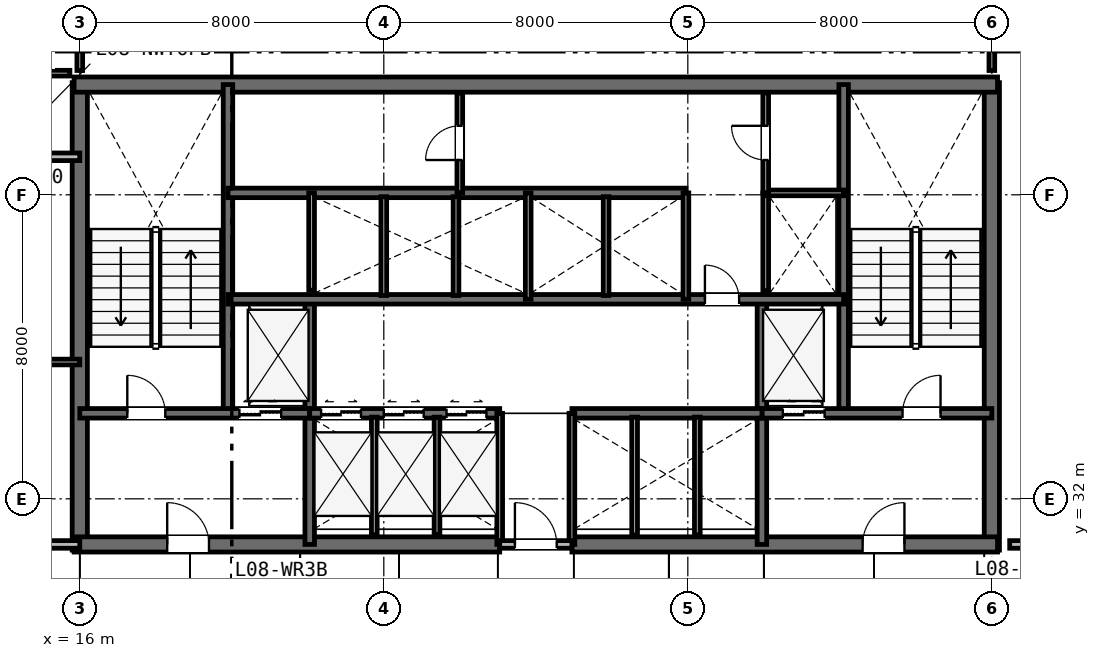
"""IFC4 building model, lengths in metres.
Left out: names, types, materials, properties, quantities, classifications, styles, units other than length and angle.
Written with IfcOpenShell. Run it as: python <this file> out.ifc"""

import sys

from ifc_helpers import new_model, si_unit, direction, frame, frame_2d, origin, place, context, subcontext, project, spatial, rectangle, extrude, element, fill, save


model = new_model("IFC4")
c1 = context("Model", 3, precision=1e-05, world=origin(), true_north=direction((0.0, 1.0)))
c2 = subcontext(c1, "Body", "Model", "MODEL_VIEW")
j1 = project(units=[si_unit("LENGTHUNIT", "METRE"), si_unit("PLANEANGLEUNIT", "RADIAN")], contexts=[c1])
p1 = place(None, origin())
s1 = spatial("IfcSite", under=j1, at=p1, CompositionType="ELEMENT")
p2 = place(p1, origin())
s2 = spatial("IfcBuilding", under=s1, at=p2, CompositionType="ELEMENT")
p3 = place(p2, frame((0.0, 0.0, 36.6)))
s3 = spatial("IfcBuildingStorey", under=s2, at=p3, CompositionType="ELEMENT", Elevation=36.6)
for number, where, z_axis, x_axis in (
    (1, (16.0, 30.65, 0.0), (0.0, 0.0, 1.0), (0.0, 1.0, 0.0)),
    (2, (40.0, 30.65, 0.0), (0.0, 0.0, 1.0), (0.0, 1.0, 0.0)),
):
    element("IfcWall", number, at=place(p3, frame(where, z_axis=z_axis, x_axis=x_axis)), inside=s3, PredefinedType="SHEAR", context=c2, shape_type="SweptSolid", body=[
        extrude(rectangle(XDim=12.3, YDim=0.4, at=frame_2d((6.15, 0.0))), origin(), (0.0, 0.0, 1.0), 3.6),
    ])
p4 = place(p3, frame((15.85, 42.9, 0.0), z_axis=(0.0, 0.0, 1.0), x_axis=(1.0, 0.0, 0.0)))
e3 = element("IfcWall", 3, at=p4, inside=s3, PredefinedType="SHEAR", context=c2, shape_type="SweptSolid", body=[
    extrude(rectangle(XDim=24.3, YDim=0.4, at=frame_2d((12.15, 0.0))), origin(), (0.0, 0.0, 1.0), 3.6),
])
p5 = place(p3, frame((15.85, 30.8, 0.0), z_axis=(0.0, 0.0, 1.0), x_axis=(1.0, 0.0, 0.0)))
e4 = element("IfcWall", 4, at=p5, inside=s3, PredefinedType="SHEAR", context=c2, shape_type="SweptSolid", body=[
    extrude(rectangle(XDim=11.2, YDim=0.4, at=frame_2d((5.6, 0.0))), origin(), (0.0, 0.0, 1.0), 3.6),
])
p6 = place(p5, frame((2.45, 0.0, 0.0)))
e5 = element("IfcOpeningElement", 5, at=p6, cuts=e4, PredefinedType="OPENING", context=c2, shape_type="SweptSolid", body=[
    extrude(rectangle(XDim=1.1, YDim=2.15, at=frame_2d((0.55, 1.075))), frame((0.0, 0.21, 0.0), z_axis=(0.0, -1.0, 0.0), x_axis=(1.0, 0.0, 0.0)), (0.0, 0.0, 1.0), 0.42),
])
p7 = place(p3, frame((28.95, 30.8, 0.0), z_axis=(0.0, 0.0, 1.0), x_axis=(1.0, 0.0, 0.0)))
e6 = element("IfcWall", 6, at=p7, inside=s3, PredefinedType="SHEAR", context=c2, shape_type="SweptSolid", body=[
    extrude(rectangle(XDim=11.2, YDim=0.4, at=frame_2d((5.6, 0.0))), origin(), (0.0, 0.0, 1.0), 3.6),
])
p8 = place(p7, frame((7.65, 0.0, 0.0)))
e7 = element("IfcOpeningElement", 7, at=p8, cuts=e6, PredefinedType="OPENING", context=c2, shape_type="SweptSolid", body=[
    extrude(rectangle(XDim=1.1, YDim=2.15, at=frame_2d((0.55, 1.075))), frame((0.0, 0.21, 0.0), z_axis=(0.0, -1.0, 0.0), x_axis=(1.0, 0.0, 0.0)), (0.0, 0.0, 1.0), 0.42),
])
for number, where, z_axis, x_axis in (
    (8, (19.9, 34.25, 0.0), (0.0, 0.0, 1.0), (0.0, 1.0, 0.0)),
    (9, (36.1, 34.25, 0.0), (0.0, 0.0, 1.0), (0.0, 1.0, 0.0)),
):
    element("IfcWall", number, at=place(p3, frame(where, z_axis=z_axis, x_axis=x_axis)), inside=s3, PredefinedType="SHEAR", context=c2, shape_type="SweptSolid", body=[
        extrude(rectangle(XDim=8.65, YDim=0.25, at=frame_2d((4.325, 0.0))), origin(), (0.0, 0.0, 1.0), 3.6),
    ])
for number, where, z_axis, x_axis in (
    (10, (22.05, 30.8, 0.0), (0.0, 0.0, 1.0), (0.0, 1.0, 0.0)),
    (11, (33.95, 30.8, 0.0), (0.0, 0.0, 1.0), (0.0, 1.0, 0.0)),
):
    element("IfcWall", number, at=place(p3, frame(where, z_axis=z_axis, x_axis=x_axis)), inside=s3, PredefinedType="SHEAR", context=c2, shape_type="SweptSolid", body=[
        extrude(rectangle(XDim=6.45, YDim=0.25, at=frame_2d((3.225, 0.0))), origin(), (0.0, 0.0, 1.0), 3.6),
    ])
p9 = place(p3, frame((16.0, 34.25, 0.0), z_axis=(0.0, 0.0, 1.0), x_axis=(1.0, 0.0, 0.0)))
e12 = element("IfcWall", 12, at=p9, inside=s3, PredefinedType="SHEAR", context=c2, shape_type="SweptSolid", body=[
    extrude(rectangle(XDim=6.05, YDim=0.25, at=frame_2d((3.025, 0.0))), origin(), (0.0, 0.0, 1.0), 3.6),
])
p10 = place(p9, frame((1.25, 0.0, 0.0)))
e13 = element("IfcOpeningElement", 13, at=p10, cuts=e12, PredefinedType="OPENING", context=c2, shape_type="SweptSolid", body=[
    extrude(rectangle(XDim=1.0, YDim=2.15, at=frame_2d((0.5, 1.075))), frame((0.0, 0.135, 0.0), z_axis=(0.0, -1.0, 0.0), x_axis=(1.0, 0.0, 0.0)), (0.0, 0.0, 1.0), 0.27),
])
p11 = place(p9, frame((4.2, 0.0, 0.0)))
e14 = element("IfcOpeningElement", 14, at=p11, cuts=e12, PredefinedType="OPENING", context=c2, shape_type="SweptSolid", body=[
    extrude(rectangle(XDim=1.1, YDim=2.15, at=frame_2d((0.55, 1.075))), frame((0.0, 0.135, 0.0), z_axis=(0.0, -1.0, 0.0), x_axis=(1.0, 0.0, 0.0)), (0.0, 0.0, 1.0), 0.27),
])
p12 = place(p3, frame((33.95, 34.25, 0.0), z_axis=(0.0, 0.0, 1.0), x_axis=(1.0, 0.0, 0.0)))
e15 = element("IfcWall", 15, at=p12, inside=s3, PredefinedType="SHEAR", context=c2, shape_type="SweptSolid", body=[
    extrude(rectangle(XDim=6.05, YDim=0.25, at=frame_2d((3.025, 0.0))), origin(), (0.0, 0.0, 1.0), 3.6),
])
p13 = place(p12, frame((3.7, 0.0, 0.0)))
e16 = element("IfcOpeningElement", 16, at=p13, cuts=e15, PredefinedType="OPENING", context=c2, shape_type="SweptSolid", body=[
    extrude(rectangle(XDim=1.0, YDim=2.15, at=frame_2d((0.5, 1.075))), frame((0.0, 0.135, 0.0), z_axis=(0.0, -1.0, 0.0), x_axis=(1.0, 0.0, 0.0)), (0.0, 0.0, 1.0), 0.27),
])
p14 = place(p12, frame((0.55, 0.0, 0.0)))
e17 = element("IfcOpeningElement", 17, at=p14, cuts=e15, PredefinedType="OPENING", context=c2, shape_type="SweptSolid", body=[
    extrude(rectangle(XDim=1.1, YDim=2.15, at=frame_2d((0.55, 1.075))), frame((0.0, 0.135, 0.0), z_axis=(0.0, -1.0, 0.0), x_axis=(1.0, 0.0, 0.0)), (0.0, 0.0, 1.0), 0.27),
])
p15 = place(p3, frame((22.05, 34.25, 0.0), z_axis=(0.0, 0.0, 1.0), x_axis=(1.0, 0.0, 0.0)))
e18 = element("IfcWall", 18, at=p15, inside=s3, PredefinedType="SHEAR", context=c2, shape_type="SweptSolid", body=[
    extrude(rectangle(XDim=5.0, YDim=0.25, at=frame_2d((2.5, 0.0))), origin(), (0.0, 0.0, 1.0), 3.6),
])
p16 = place(p15, frame((0.3, 0.0, 0.0)))
e19 = element("IfcOpeningElement", 19, at=p16, cuts=e18, PredefinedType="OPENING", context=c2, shape_type="SweptSolid", body=[
    extrude(rectangle(XDim=1.05, YDim=2.15, at=frame_2d((0.525, 1.075))), frame((0.0, 0.135, 0.0), z_axis=(0.0, -1.0, 0.0), x_axis=(1.0, 0.0, 0.0)), (0.0, 0.0, 1.0), 0.27),
])
p17 = place(p15, frame((1.95, 0.0, 0.0)))
e20 = element("IfcOpeningElement", 20, at=p17, cuts=e18, PredefinedType="OPENING", context=c2, shape_type="SweptSolid", body=[
    extrude(rectangle(XDim=1.05, YDim=2.15, at=frame_2d((0.525, 1.075))), frame((0.0, 0.135, 0.0), z_axis=(0.0, -1.0, 0.0), x_axis=(1.0, 0.0, 0.0)), (0.0, 0.0, 1.0), 0.27),
])
p18 = place(p15, frame((3.6, 0.0, 0.0)))
e21 = element("IfcOpeningElement", 21, at=p18, cuts=e18, PredefinedType="OPENING", context=c2, shape_type="SweptSolid", body=[
    extrude(rectangle(XDim=1.05, YDim=2.15, at=frame_2d((0.525, 1.075))), frame((0.0, 0.135, 0.0), z_axis=(0.0, -1.0, 0.0), x_axis=(1.0, 0.0, 0.0)), (0.0, 0.0, 1.0), 0.27),
])
p19 = place(p3, frame((28.95, 34.25, 0.0), z_axis=(0.0, 0.0, 1.0), x_axis=(1.0, 0.0, 0.0)))
e22 = element("IfcWall", 22, at=p19, inside=s3, PredefinedType="SHEAR", context=c2, shape_type="SweptSolid", body=[
    extrude(rectangle(XDim=5.0, YDim=0.25, at=frame_2d((2.5, 0.0))), origin(), (0.0, 0.0, 1.0), 3.6),
])
p20 = place(p3, frame((19.9, 37.25, 0.0), z_axis=(0.0, 0.0, 1.0), x_axis=(1.0, 0.0, 0.0)))
e23 = element("IfcWall", 23, at=p20, inside=s3, PredefinedType="SHEAR", context=c2, shape_type="SweptSolid", body=[
    extrude(rectangle(XDim=16.2, YDim=0.25, at=frame_2d((8.1, 0.0))), origin(), (0.0, 0.0, 1.0), 3.6),
])
p21 = place(p20, frame((12.55, 0.0, 0.0)))
e24 = element("IfcOpeningElement", 24, at=p21, cuts=e23, PredefinedType="OPENING", context=c2, shape_type="SweptSolid", body=[
    extrude(rectangle(XDim=0.9, YDim=2.15, at=frame_2d((0.45, 1.075))), frame((0.0, 0.135, 0.0), z_axis=(0.0, -1.0, 0.0), x_axis=(1.0, 0.0, 0.0)), (0.0, 0.0, 1.0), 0.27),
])
p22 = place(p3, frame((19.9, 40.05, 0.0), z_axis=(0.0, 0.0, 1.0), x_axis=(1.0, 0.0, 0.0)))
e25 = element("IfcWall", 25, at=p22, inside=s3, PredefinedType="SHEAR", context=c2, shape_type="SweptSolid", body=[
    extrude(rectangle(XDim=12.05, YDim=0.25, at=frame_2d((6.025, 0.0))), origin(), (0.0, 0.0, 1.0), 3.6),
])
for number, where, z_axis, x_axis in (
    (26, (27.05, 30.8, 0.0), (0.0, 0.0, 1.0), (0.0, 1.0, 0.0)),
    (27, (28.95, 30.8, 0.0), (0.0, 0.0, 1.0), (0.0, 1.0, 0.0)),
):
    element("IfcWall", number, at=place(p3, frame(where, z_axis=z_axis, x_axis=x_axis)), inside=s3, PredefinedType="PLUMBINGWALL", context=c2, shape_type="SweptSolid", body=[
        extrude(rectangle(XDim=3.45, YDim=0.15, at=frame_2d((1.725, 0.0))), origin(), (0.0, 0.0, 1.0), 3.33),
    ])
p23 = place(p3, frame((27.05, 30.8, 0.0), z_axis=(0.0, 0.0, 1.0), x_axis=(1.0, 0.0, 0.0)))
e28 = element("IfcWall", 28, at=p23, inside=s3, PredefinedType="PARTITIONING", context=c2, shape_type="SweptSolid", body=[
    extrude(rectangle(XDim=1.9, YDim=0.2, at=frame_2d((0.95, 0.0))), origin(), (0.0, 0.0, 1.0), 3.33),
])
p24 = place(p23, frame((0.4, 0.0, 0.0)))
e29 = element("IfcOpeningElement", 29, at=p24, cuts=e28, PredefinedType="OPENING", context=c2, shape_type="SweptSolid", body=[
    extrude(rectangle(XDim=1.1, YDim=2.15, at=frame_2d((0.55, 1.075))), frame((0.0, 0.11, 0.0), z_axis=(0.0, -1.0, 0.0), x_axis=(1.0, 0.0, 0.0)), (0.0, 0.0, 1.0), 0.22),
])
for number, where, z_axis, x_axis in (
    (30, (23.75, 31.05, 0.0), (0.0, 0.0, 1.0), (0.0, 1.0, 0.0)),
    (31, (25.4, 31.05, 0.0), (0.0, 0.0, 1.0), (0.0, 1.0, 0.0)),
    (32, (30.6, 31.05, 0.0), (0.0, 0.0, 1.0), (0.0, 1.0, 0.0)),
    (33, (32.25, 31.05, 0.0), (0.0, 0.0, 1.0), (0.0, 1.0, 0.0)),
):
    element("IfcWall", number, at=place(p3, frame(where, z_axis=z_axis, x_axis=x_axis)), inside=s3, PredefinedType="PLUMBINGWALL", context=c2, shape_type="SweptSolid", body=[
        extrude(rectangle(XDim=3.1, YDim=0.15, at=frame_2d((1.55, 0.0))), origin(), (0.0, 0.0, 1.0), 3.33),
    ])
p25 = place(p3, frame((22.1, 37.49, 0.0), z_axis=(0.0, 0.0, 1.0), x_axis=(0.0, 1.0, 0.0)))
e34 = element("IfcWall", 34, at=p25, inside=s3, PredefinedType="PLUMBINGWALL", context=c2, shape_type="SweptSolid", body=[
    extrude(rectangle(XDim=2.56, YDim=0.15, at=frame_2d((1.28, 0.0))), origin(), (0.0, 0.0, 1.0), 3.33),
])
p26 = place(p3, frame((27.8, 37.25, 0.0), z_axis=(0.0, 0.0, 1.0), x_axis=(0.0, 1.0, 0.0)))
e35 = element("IfcWall", 35, at=p26, inside=s3, PredefinedType="PLUMBINGWALL", context=c2, shape_type="SweptSolid", body=[
    extrude(rectangle(XDim=2.8, YDim=0.15, at=frame_2d((1.4, 0.0))), origin(), (0.0, 0.0, 1.0), 3.33),
])
for number, where, z_axis, x_axis in (
    (36, (24.0, 37.35, 0.0), (0.0, 0.0, 1.0), (0.0, 1.0, 0.0)),
    (37, (25.9, 37.35, 0.0), (0.0, 0.0, 1.0), (0.0, 1.0, 0.0)),
):
    element("IfcWall", number, at=place(p3, frame(where, z_axis=z_axis, x_axis=x_axis)), inside=s3, PredefinedType="PLUMBINGWALL", context=c2, shape_type="SweptSolid", body=[
        extrude(rectangle(XDim=2.6, YDim=0.15, at=frame_2d((1.3, 0.0))), origin(), (0.0, 0.0, 1.0), 3.33),
    ])
p27 = place(p3, frame((31.95, 37.25, 0.0), z_axis=(0.0, 0.0, 1.0), x_axis=(0.0, 1.0, 0.0)))
e38 = element("IfcWall", 38, at=p27, inside=s3, PredefinedType="PLUMBINGWALL", context=c2, shape_type="SweptSolid", body=[
    extrude(rectangle(XDim=2.8, YDim=0.15, at=frame_2d((1.4, 0.0))), origin(), (0.0, 0.0, 1.0), 3.33),
])
p28 = place(p3, frame((29.85, 37.35, 0.0), z_axis=(0.0, 0.0, 1.0), x_axis=(0.0, 1.0, 0.0)))
e39 = element("IfcWall", 39, at=p28, inside=s3, PredefinedType="PLUMBINGWALL", context=c2, shape_type="SweptSolid", body=[
    extrude(rectangle(XDim=2.6, YDim=0.15, at=frame_2d((1.3, 0.0))), origin(), (0.0, 0.0, 1.0), 3.33),
])
p29 = place(p3, frame((34.05, 37.473, 0.0), z_axis=(0.0, 0.0, 1.0), x_axis=(0.0, 1.0, 0.0)))
e40 = element("IfcWall", 40, at=p29, inside=s3, PredefinedType="PLUMBINGWALL", context=c2, shape_type="SweptSolid", body=[
    extrude(rectangle(XDim=2.577, YDim=0.15, at=frame_2d((1.288, 0.0))), origin(), (0.0, 0.0, 1.0), 3.33),
])
p30 = place(p3, frame((34.05, 40.05, 0.0), z_axis=(0.0, 0.0, 1.0), x_axis=(1.0, 0.0, 0.0)))
e41 = element("IfcWall", 41, at=p30, inside=s3, PredefinedType="PARTITIONING", context=c2, shape_type="SweptSolid", body=[
    extrude(rectangle(XDim=2.05, YDim=0.15, at=frame_2d((1.025, 0.0))), origin(), (0.0, 0.0, 1.0), 3.33),
])
p31 = place(p3, frame((34.05, 40.05, 0.0), z_axis=(0.0, 0.0, 1.0), x_axis=(0.0, 1.0, 0.0)))
e42 = element("IfcWall", 42, at=p31, inside=s3, PredefinedType="PARTITIONING", context=c2, shape_type="SweptSolid", body=[
    extrude(rectangle(XDim=2.63, YDim=0.15, at=frame_2d((1.315, 0.0))), origin(), (0.0, 0.0, 1.0), 3.33),
])
p32 = place(p31, frame((0.865, 0.0, 0.0)))
e43 = element("IfcOpeningElement", 43, at=p32, cuts=e42, PredefinedType="OPENING", context=c2, shape_type="SweptSolid", body=[
    extrude(rectangle(XDim=0.9, YDim=2.15, at=frame_2d((0.45, 1.075))), frame((0.0, 0.085, 0.0), z_axis=(0.0, -1.0, 0.0), x_axis=(1.0, 0.0, 0.0)), (0.0, 0.0, 1.0), 0.17),
])
p33 = place(p3, frame((26.0, 40.05, 0.0), z_axis=(0.0, 0.0, 1.0), x_axis=(0.0, 1.0, 0.0)))
e44 = element("IfcWall", 44, at=p33, inside=s3, PredefinedType="PARTITIONING", context=c2, shape_type="SweptSolid", body=[
    extrude(rectangle(XDim=2.63, YDim=0.15, at=frame_2d((1.315, 0.0))), origin(), (0.0, 0.0, 1.0), 3.33),
])
p34 = place(p33, frame((0.865, 0.0, 0.0)))
e45 = element("IfcOpeningElement", 45, at=p34, cuts=e44, PredefinedType="OPENING", context=c2, shape_type="SweptSolid", body=[
    extrude(rectangle(XDim=0.9, YDim=2.15, at=frame_2d((0.45, 1.075))), frame((0.0, 0.085, 0.0), z_axis=(0.0, -1.0, 0.0), x_axis=(1.0, 0.0, 0.0)), (0.0, 0.0, 1.0), 0.17),
])
p35 = place(p3, frame((8.3, 35.6, 0.0), z_axis=(0.0, 0.0, 1.0), x_axis=(1.0, 0.0, 0.0)))
e46 = element("IfcWall", 46, at=p35, inside=s3, PredefinedType="PARTITIONING", context=c2, shape_type="SweptSolid", body=[
    extrude(rectangle(XDim=7.7, YDim=0.15, at=frame_2d((3.85, 0.0))), origin(), (0.0, 0.0, 1.0), 2.82),
])
p36 = place(p3, frame((8.3, 30.8, 0.0), z_axis=(0.0, 0.0, 1.0), x_axis=(1.0, 0.0, 0.0)))
e47 = element("IfcWall", 47, at=p36, inside=s3, PredefinedType="PARTITIONING", context=c2, shape_type="SweptSolid", body=[
    extrude(rectangle(XDim=7.7, YDim=0.2, at=frame_2d((3.85, 0.0))), origin(), (0.0, 0.0, 1.0), 2.82),
])
p37 = place(p36, frame((5.325, 0.0, 0.0)))
e48 = element("IfcOpeningElement", 48, at=p37, cuts=e47, PredefinedType="OPENING", context=c2, shape_type="SweptSolid", body=[
    extrude(rectangle(XDim=0.95, YDim=2.15, at=frame_2d((0.475, 1.075))), frame((0.0, 0.11, 0.0), z_axis=(0.0, -1.0, 0.0), x_axis=(1.0, 0.0, 0.0)), (0.0, 0.0, 1.0), 0.22),
])
p38 = place(p3, frame((0.1, 41.0, 0.0), z_axis=(0.0, 0.0, 1.0), x_axis=(1.0, 0.0, 0.0)))
e49 = element("IfcWall", 49, at=p38, inside=s3, PredefinedType="PARTITIONING", context=c2, shape_type="SweptSolid", body=[
    extrude(rectangle(XDim=15.9, YDim=0.2, at=frame_2d((7.95, 0.0))), origin(), (0.0, 0.0, 1.0), 2.82),
])
p39 = place(p38, frame((6.779, 0.0, 0.0)))
e50 = element("IfcOpeningElement", 50, at=p39, cuts=e49, PredefinedType="OPENING", context=c2, shape_type="SweptSolid", body=[
    extrude(rectangle(XDim=0.95, YDim=2.15, at=frame_2d((0.475, 1.075))), frame((0.0, 0.11, 0.0), z_axis=(0.0, -1.0, 0.0), x_axis=(1.0, 0.0, 0.0)), (0.0, 0.0, 1.0), 0.22),
])
p40 = place(p3, frame((13.55, 43.2, 0.0), z_axis=(0.0, 0.0, 1.0), x_axis=(1.0, 0.0, 0.0)))
e51 = element("IfcWall", 51, at=p40, inside=s3, PredefinedType="PARTITIONING", context=c2, shape_type="SweptSolid", body=[
    extrude(rectangle(XDim=2.19, YDim=0.15, at=frame_2d((1.095, 0.0))), origin(), (0.0, 0.0, 1.0), 3.33),
])
for number, where, z_axis, x_axis in (
    (52, (16.0, 43.27, 0.0), (0.0, 0.0, 1.0), (0.0, 1.0, 0.0)),
    (53, (40.0, 43.27, 0.0), (0.0, 0.0, 1.0), (0.0, 1.0, 0.0)),
):
    element("IfcWall", number, at=place(p3, frame(where, z_axis=z_axis, x_axis=x_axis)), inside=s3, PredefinedType="PARTITIONING", context=c2, shape_type="SweptSolid", body=[
        extrude(rectangle(XDim=4.63, YDim=0.15, at=frame_2d((2.315, 0.0))), origin(), (0.0, 0.0, 1.0), 2.93),
    ])
p41 = place(p3, frame((40.47, 30.8, 0.0), z_axis=(0.0, 0.0, 1.0), x_axis=(1.0, 0.0, 0.0)))
e54 = element("IfcWall", 54, at=p41, inside=s3, PredefinedType="PARTITIONING", context=c2, shape_type="SweptSolid", body=[
    extrude(rectangle(XDim=15.43, YDim=0.2, at=frame_2d((7.715, 0.0))), origin(), (0.0, 0.0, 1.0), 2.82),
])
p42 = place(p41, frame((6.673, 0.0, 0.0)))
e55 = element("IfcOpeningElement", 55, at=p42, cuts=e54, PredefinedType="OPENING", context=c2, shape_type="SweptSolid", body=[
    extrude(rectangle(XDim=0.95, YDim=2.15, at=frame_2d((0.475, 1.075))), frame((0.0, 0.11, 0.0), z_axis=(0.0, -1.0, 0.0), x_axis=(1.0, 0.0, 0.0)), (0.0, 0.0, 1.0), 0.22),
])
p43 = place(p24, origin())
e56 = element("IfcDoor", 56, at=p43, inside=s3, OperationType="SINGLE_SWING_LEFT", PredefinedType="DOOR", context=c2, shape_type="SweptSolid", body=[
    extrude(rectangle(XDim=1.1, YDim=2.15, at=frame_2d((0.55, 1.075))), frame((0.0, 0.025, 0.0), z_axis=(0.0, -1.0, 0.0), x_axis=(1.0, 0.0, 0.0)), (0.0, 0.0, 1.0), 0.05),
])
fill(e29, e56)
p44 = place(p10, origin())
e57 = element("IfcDoor", 57, at=p44, inside=s3, OperationType="SINGLE_SWING_LEFT", PredefinedType="DOOR", context=c2, shape_type="SweptSolid", body=[
    extrude(rectangle(XDim=1.0, YDim=2.15, at=frame_2d((0.5, 1.075))), frame((0.0, 0.025, 0.0), z_axis=(0.0, -1.0, 0.0), x_axis=(1.0, 0.0, 0.0)), (0.0, 0.0, 1.0), 0.05),
])
fill(e13, e57)
p45 = place(p13, origin())
e58 = element("IfcDoor", 58, at=p45, inside=s3, OperationType="SINGLE_SWING_RIGHT", PredefinedType="DOOR", context=c2, shape_type="SweptSolid", body=[
    extrude(rectangle(XDim=1.0, YDim=2.15, at=frame_2d((0.5, 1.075))), frame((0.0, 0.025, 0.0), z_axis=(0.0, -1.0, 0.0), x_axis=(1.0, 0.0, 0.0)), (0.0, 0.0, 1.0), 0.05),
])
fill(e16, e58)
p46 = place(p6, origin())
e59 = element("IfcDoor", 59, at=p46, inside=s3, OperationType="SINGLE_SWING_LEFT", PredefinedType="DOOR", context=c2, shape_type="SweptSolid", body=[
    extrude(rectangle(XDim=1.1, YDim=2.15, at=frame_2d((0.55, 1.075))), frame((0.0, 0.025, 0.0), z_axis=(0.0, -1.0, 0.0), x_axis=(1.0, 0.0, 0.0)), (0.0, 0.0, 1.0), 0.05),
])
fill(e5, e59)
p47 = place(p8, origin())
e60 = element("IfcDoor", 60, at=p47, inside=s3, OperationType="SINGLE_SWING_RIGHT", PredefinedType="DOOR", context=c2, shape_type="SweptSolid", body=[
    extrude(rectangle(XDim=1.1, YDim=2.15, at=frame_2d((0.55, 1.075))), frame((0.0, 0.025, 0.0), z_axis=(0.0, -1.0, 0.0), x_axis=(1.0, 0.0, 0.0)), (0.0, 0.0, 1.0), 0.05),
])
fill(e7, e60)
p48 = place(p21, origin())
e61 = element("IfcDoor", 61, at=p48, inside=s3, OperationType="SINGLE_SWING_LEFT", PredefinedType="DOOR", context=c2, shape_type="SweptSolid", body=[
    extrude(rectangle(XDim=0.9, YDim=2.15, at=frame_2d((0.45, 1.075))), frame((0.0, 0.025, 0.0), z_axis=(0.0, -1.0, 0.0), x_axis=(1.0, 0.0, 0.0)), (0.0, 0.0, 1.0), 0.05),
])
fill(e24, e61)
p49 = place(p32, origin())
e62 = element("IfcDoor", 62, at=p49, inside=s3, OperationType="SINGLE_SWING_RIGHT", PredefinedType="DOOR", context=c2, shape_type="SweptSolid", body=[
    extrude(rectangle(XDim=0.9, YDim=2.15, at=frame_2d((0.45, 1.075))), frame((0.0, 0.025, 0.0), z_axis=(0.0, -1.0, 0.0), x_axis=(1.0, 0.0, 0.0)), (0.0, 0.0, 1.0), 0.05),
])
fill(e43, e62)
p50 = place(p34, origin())
e63 = element("IfcDoor", 63, at=p50, inside=s3, OperationType="SINGLE_SWING_LEFT", PredefinedType="DOOR", context=c2, shape_type="SweptSolid", body=[
    extrude(rectangle(XDim=0.9, YDim=2.15, at=frame_2d((0.45, 1.075))), frame((0.0, 0.025, 0.0), z_axis=(0.0, -1.0, 0.0), x_axis=(1.0, 0.0, 0.0)), (0.0, 0.0, 1.0), 0.05),
])
fill(e45, e63)
p51 = place(p11, origin())
e64 = element("IfcDoor", 64, at=p51, inside=s3, OperationType="DOUBLE_DOOR_SLIDING", PredefinedType="DOOR", context=c2, shape_type="SweptSolid", body=[
    extrude(rectangle(XDim=1.1, YDim=2.15, at=frame_2d((0.55, 1.075))), frame((0.0, 0.025, 0.0), z_axis=(0.0, -1.0, 0.0), x_axis=(1.0, 0.0, 0.0)), (0.0, 0.0, 1.0), 0.05),
])
fill(e14, e64)
p52 = place(p14, origin())
e65 = element("IfcDoor", 65, at=p52, inside=s3, OperationType="DOUBLE_DOOR_SLIDING", PredefinedType="DOOR", context=c2, shape_type="SweptSolid", body=[
    extrude(rectangle(XDim=1.1, YDim=2.15, at=frame_2d((0.55, 1.075))), frame((0.0, 0.025, 0.0), z_axis=(0.0, -1.0, 0.0), x_axis=(1.0, 0.0, 0.0)), (0.0, 0.0, 1.0), 0.05),
])
fill(e17, e65)
p53 = place(p16, origin())
e66 = element("IfcDoor", 66, at=p53, inside=s3, OperationType="DOUBLE_DOOR_SLIDING", PredefinedType="DOOR", context=c2, shape_type="SweptSolid", body=[
    extrude(rectangle(XDim=1.05, YDim=2.15, at=frame_2d((0.525, 1.075))), frame((0.0, 0.025, 0.0), z_axis=(0.0, -1.0, 0.0), x_axis=(1.0, 0.0, 0.0)), (0.0, 0.0, 1.0), 0.05),
])
fill(e19, e66)
p54 = place(p17, origin())
e67 = element("IfcDoor", 67, at=p54, inside=s3, OperationType="DOUBLE_DOOR_SLIDING", PredefinedType="DOOR", context=c2, shape_type="SweptSolid", body=[
    extrude(rectangle(XDim=1.05, YDim=2.15, at=frame_2d((0.525, 1.075))), frame((0.0, 0.025, 0.0), z_axis=(0.0, -1.0, 0.0), x_axis=(1.0, 0.0, 0.0)), (0.0, 0.0, 1.0), 0.05),
])
fill(e20, e67)
p55 = place(p18, origin())
e68 = element("IfcDoor", 68, at=p55, inside=s3, OperationType="DOUBLE_DOOR_SLIDING", PredefinedType="DOOR", context=c2, shape_type="SweptSolid", body=[
    extrude(rectangle(XDim=1.05, YDim=2.15, at=frame_2d((0.525, 1.075))), frame((0.0, 0.025, 0.0), z_axis=(0.0, -1.0, 0.0), x_axis=(1.0, 0.0, 0.0)), (0.0, 0.0, 1.0), 0.05),
])
fill(e21, e68)
save(model, sys.argv[1])
